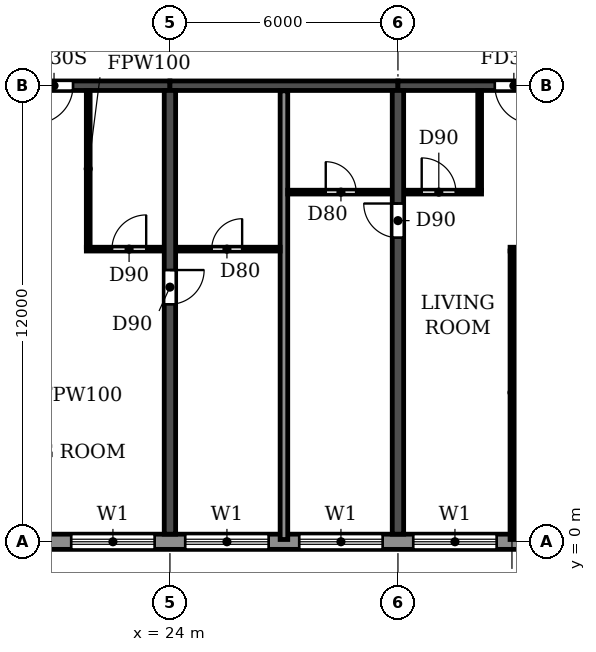
"""IFC4 building model, lengths in metres.
Left out: names, types, materials, properties, quantities, classifications, styles, units other than length and angle.
Written with IfcOpenShell. Run it as: python <this file> out.ifc"""

import sys

from ifc_helpers import new_model, si_unit, direction, frame, frame_2d, origin, place, context, subcontext, project, spatial, rectangle, extrude, element, fill, save


model = new_model("IFC4")
c1 = context("Model", 3, precision=1e-05, world=origin(), true_north=direction((0.0, 1.0)))
c2 = subcontext(c1, "Body", "Model", "MODEL_VIEW")
j1 = project(units=[si_unit("LENGTHUNIT", "METRE"), si_unit("PLANEANGLEUNIT", "RADIAN")], contexts=[c1])
p1 = place(None, origin())
s1 = spatial("IfcSite", under=j1, at=p1, CompositionType="ELEMENT")
p2 = place(p1, origin())
s2 = spatial("IfcBuilding", under=s1, at=p2, CompositionType="ELEMENT")
p3 = place(p2, frame((0.0, 0.0, 122.4)))
s3 = spatial("IfcBuildingStorey", under=s2, at=p3, CompositionType="ELEMENT", Elevation=122.4)
p4 = place(p3, frame((24.0, 0.2, 0.0), z_axis=(0.0, 0.0, 1.0), x_axis=(0.0, 1.0, 0.0)))
e1 = element("IfcWall", 1, at=p4, inside=s3, PredefinedType="SHEAR", context=c2, shape_type="SweptSolid", body=[
    extrude(rectangle(XDim=11.675, YDim=0.3, at=frame_2d((5.837, 0.0))), origin(), (0.0, 0.0, 1.0), 3.07),
])
p5 = place(p4, frame((6.05, 0.0, 0.0)))
e2 = element("IfcOpeningElement", 2, at=p5, cuts=e1, PredefinedType="OPENING", context=c2, shape_type="SweptSolid", body=[
    extrude(rectangle(XDim=0.9, YDim=2.1, at=frame_2d((0.45, 1.05))), frame((0.0, 0.16, 0.0), z_axis=(0.0, -1.0, 0.0), x_axis=(1.0, 0.0, 0.0)), (0.0, 0.0, 1.0), 0.32),
])
p6 = place(p3, frame((30.0, 0.2, 0.0), z_axis=(0.0, 0.0, 1.0), x_axis=(0.0, 1.0, 0.0)))
e3 = element("IfcWall", 3, at=p6, inside=s3, PredefinedType="SHEAR", context=c2, shape_type="SweptSolid", body=[
    extrude(rectangle(XDim=11.675, YDim=0.3, at=frame_2d((5.837, 0.0))), origin(), (0.0, 0.0, 1.0), 3.07),
])
p7 = place(p6, frame((7.8, 0.0, 0.0)))
e4 = element("IfcOpeningElement", 4, at=p7, cuts=e3, PredefinedType="OPENING", context=c2, shape_type="SweptSolid", body=[
    extrude(rectangle(XDim=0.9, YDim=2.1, at=frame_2d((0.45, 1.05))), frame((0.0, 0.16, 0.0), z_axis=(0.0, -1.0, 0.0), x_axis=(1.0, 0.0, 0.0)), (0.0, 0.0, 1.0), 0.32),
])
p8 = place(p3, frame((18.0, 12.0, 0.0), z_axis=(0.0, 0.0, 1.0), x_axis=(1.0, 0.0, 0.0)))
e5 = element("IfcWall", 5, at=p8, inside=s3, PredefinedType="SHEAR", context=c2, shape_type="SweptSolid", body=[
    extrude(rectangle(XDim=6.0, YDim=0.25, at=frame_2d((3.0, 0.0))), origin(), (0.0, 0.0, 1.0), 2.47),
])
p9 = place(p8, frame((2.45, 0.0, 0.0)))
e6 = element("IfcOpeningElement", 6, at=p9, cuts=e5, PredefinedType="OPENING", context=c2, shape_type="SweptSolid", body=[
    extrude(rectangle(XDim=1.0, YDim=2.1, at=frame_2d((0.5, 1.05))), frame((0.0, 0.135, 0.0), z_axis=(0.0, -1.0, 0.0), x_axis=(1.0, 0.0, 0.0)), (0.0, 0.0, 1.0), 0.27),
])
p10 = place(p3, frame((24.0, 12.0, 0.0), z_axis=(0.0, 0.0, 1.0), x_axis=(1.0, 0.0, 0.0)))
e7 = element("IfcWall", 7, at=p10, inside=s3, PredefinedType="SHEAR", context=c2, shape_type="SweptSolid", body=[
    extrude(rectangle(XDim=6.0, YDim=0.25, at=frame_2d((3.0, 0.0))), origin(), (0.0, 0.0, 1.0), 2.47),
])
p11 = place(p3, frame((30.0, 12.0, 0.0), z_axis=(0.0, 0.0, 1.0), x_axis=(1.0, 0.0, 0.0)))
e8 = element("IfcWall", 8, at=p11, inside=s3, PredefinedType="SHEAR", context=c2, shape_type="SweptSolid", body=[
    extrude(rectangle(XDim=6.0, YDim=0.25, at=frame_2d((3.0, 0.0))), origin(), (0.0, 0.0, 1.0), 2.47),
])
p12 = place(p11, frame((2.55, 0.0, 0.0)))
e9 = element("IfcOpeningElement", 9, at=p12, cuts=e8, PredefinedType="OPENING", context=c2, shape_type="SweptSolid", body=[
    extrude(rectangle(XDim=1.0, YDim=2.1, at=frame_2d((0.5, 1.05))), frame((0.0, 0.135, 0.0), z_axis=(0.0, -1.0, 0.0), x_axis=(1.0, 0.0, 0.0)), (0.0, 0.0, 1.0), 0.27),
])
p13 = place(p3, frame((16.683, 0.0, 0.0), z_axis=(0.0, 0.0, 1.0), x_axis=(1.0, 0.0, 0.0)))
e10 = element("IfcWall", 10, at=p13, inside=s3, PredefinedType="STANDARD", context=c2, shape_type="SweptSolid", body=[
    extrude(rectangle(XDim=68.634, YDim=0.4, at=frame_2d((34.317, 0.0))), origin(), (0.0, 0.0, 1.0), 3.07),
])
p14 = place(p13, frame((1.717, 0.0, 0.9)))
e11 = element("IfcOpeningElement", 11, at=p14, cuts=e10, PredefinedType="OPENING", context=c2, shape_type="SweptSolid", body=[
    extrude(rectangle(XDim=2.2, YDim=1.5, at=frame_2d((1.1, 0.75))), frame((0.0, 0.21, 0.0), z_axis=(0.0, -1.0, 0.0), x_axis=(1.0, 0.0, 0.0)), (0.0, 0.0, 1.0), 0.42),
])
p15 = place(p13, frame((4.717, 0.0, 0.9)))
e12 = element("IfcOpeningElement", 12, at=p15, cuts=e10, PredefinedType="OPENING", context=c2, shape_type="SweptSolid", body=[
    extrude(rectangle(XDim=2.2, YDim=1.5, at=frame_2d((1.1, 0.75))), frame((0.0, 0.21, 0.0), z_axis=(0.0, -1.0, 0.0), x_axis=(1.0, 0.0, 0.0)), (0.0, 0.0, 1.0), 0.42),
])
p16 = place(p13, frame((7.717, 0.0, 0.9)))
e13 = element("IfcOpeningElement", 13, at=p16, cuts=e10, PredefinedType="OPENING", context=c2, shape_type="SweptSolid", body=[
    extrude(rectangle(XDim=2.2, YDim=1.5, at=frame_2d((1.1, 0.75))), frame((0.0, 0.21, 0.0), z_axis=(0.0, -1.0, 0.0), x_axis=(1.0, 0.0, 0.0)), (0.0, 0.0, 1.0), 0.42),
])
p17 = place(p13, frame((10.717, 0.0, 0.9)))
e14 = element("IfcOpeningElement", 14, at=p17, cuts=e10, PredefinedType="OPENING", context=c2, shape_type="SweptSolid", body=[
    extrude(rectangle(XDim=2.2, YDim=1.5, at=frame_2d((1.1, 0.75))), frame((0.0, 0.21, 0.0), z_axis=(0.0, -1.0, 0.0), x_axis=(1.0, 0.0, 0.0)), (0.0, 0.0, 1.0), 0.42),
])
p18 = place(p13, frame((13.717, 0.0, 0.9)))
e15 = element("IfcOpeningElement", 15, at=p18, cuts=e10, PredefinedType="OPENING", context=c2, shape_type="SweptSolid", body=[
    extrude(rectangle(XDim=2.2, YDim=1.5, at=frame_2d((1.1, 0.75))), frame((0.0, 0.21, 0.0), z_axis=(0.0, -1.0, 0.0), x_axis=(1.0, 0.0, 0.0)), (0.0, 0.0, 1.0), 0.42),
])
p19 = place(p13, frame((16.717, 0.0, 0.9)))
e16 = element("IfcOpeningElement", 16, at=p19, cuts=e10, PredefinedType="OPENING", context=c2, shape_type="SweptSolid", body=[
    extrude(rectangle(XDim=2.2, YDim=1.5, at=frame_2d((1.1, 0.75))), frame((0.0, 0.21, 0.0), z_axis=(0.0, -1.0, 0.0), x_axis=(1.0, 0.0, 0.0)), (0.0, 0.0, 1.0), 0.42),
])
p20 = place(p13, frame((19.717, 0.0, 0.9)))
e17 = element("IfcOpeningElement", 17, at=p20, cuts=e10, PredefinedType="OPENING", context=c2, shape_type="SweptSolid", body=[
    extrude(rectangle(XDim=2.2, YDim=1.5, at=frame_2d((1.1, 0.75))), frame((0.0, 0.21, 0.0), z_axis=(0.0, -1.0, 0.0), x_axis=(1.0, 0.0, 0.0)), (0.0, 0.0, 1.0), 0.42),
])
p21 = place(p13, frame((22.917, 0.0, 0.0)))
e18 = element("IfcOpeningElement", 18, at=p21, cuts=e10, PredefinedType="OPENING", context=c2, shape_type="SweptSolid", body=[
    extrude(rectangle(XDim=1.8, YDim=2.4, at=frame_2d((0.9, 1.2))), frame((0.0, 0.21, 0.0), z_axis=(0.0, -1.0, 0.0), x_axis=(1.0, 0.0, 0.0)), (0.0, 0.0, 1.0), 0.42),
])
p22 = place(p13, frame((25.717, 0.0, 0.9)))
e19 = element("IfcOpeningElement", 19, at=p22, cuts=e10, PredefinedType="OPENING", context=c2, shape_type="SweptSolid", body=[
    extrude(rectangle(XDim=2.2, YDim=1.5, at=frame_2d((1.1, 0.75))), frame((0.0, 0.21, 0.0), z_axis=(0.0, -1.0, 0.0), x_axis=(1.0, 0.0, 0.0)), (0.0, 0.0, 1.0), 0.42),
])
p23 = place(p13, frame((28.717, 0.0, 0.9)))
e20 = element("IfcOpeningElement", 20, at=p23, cuts=e10, PredefinedType="OPENING", context=c2, shape_type="SweptSolid", body=[
    extrude(rectangle(XDim=2.2, YDim=1.5, at=frame_2d((1.1, 0.75))), frame((0.0, 0.21, 0.0), z_axis=(0.0, -1.0, 0.0), x_axis=(1.0, 0.0, 0.0)), (0.0, 0.0, 1.0), 0.42),
])
p24 = place(p13, frame((31.717, 0.0, 0.9)))
e21 = element("IfcOpeningElement", 21, at=p24, cuts=e10, PredefinedType="OPENING", context=c2, shape_type="SweptSolid", body=[
    extrude(rectangle(XDim=2.2, YDim=1.5, at=frame_2d((1.1, 0.75))), frame((0.0, 0.21, 0.0), z_axis=(0.0, -1.0, 0.0), x_axis=(1.0, 0.0, 0.0)), (0.0, 0.0, 1.0), 0.42),
])
p25 = place(p13, frame((34.917, 0.0, 0.0)))
e22 = element("IfcOpeningElement", 22, at=p25, cuts=e10, PredefinedType="OPENING", context=c2, shape_type="SweptSolid", body=[
    extrude(rectangle(XDim=1.8, YDim=2.4, at=frame_2d((0.9, 1.2))), frame((0.0, 0.21, 0.0), z_axis=(0.0, -1.0, 0.0), x_axis=(1.0, 0.0, 0.0)), (0.0, 0.0, 1.0), 0.42),
])
p26 = place(p13, frame((37.717, 0.0, 0.9)))
e23 = element("IfcOpeningElement", 23, at=p26, cuts=e10, PredefinedType="OPENING", context=c2, shape_type="SweptSolid", body=[
    extrude(rectangle(XDim=2.2, YDim=1.5, at=frame_2d((1.1, 0.75))), frame((0.0, 0.21, 0.0), z_axis=(0.0, -1.0, 0.0), x_axis=(1.0, 0.0, 0.0)), (0.0, 0.0, 1.0), 0.42),
])
p27 = place(p13, frame((40.717, 0.0, 0.9)))
e24 = element("IfcOpeningElement", 24, at=p27, cuts=e10, PredefinedType="OPENING", context=c2, shape_type="SweptSolid", body=[
    extrude(rectangle(XDim=2.2, YDim=1.5, at=frame_2d((1.1, 0.75))), frame((0.0, 0.21, 0.0), z_axis=(0.0, -1.0, 0.0), x_axis=(1.0, 0.0, 0.0)), (0.0, 0.0, 1.0), 0.42),
])
p28 = place(p13, frame((43.717, 0.0, 0.9)))
e25 = element("IfcOpeningElement", 25, at=p28, cuts=e10, PredefinedType="OPENING", context=c2, shape_type="SweptSolid", body=[
    extrude(rectangle(XDim=2.2, YDim=1.5, at=frame_2d((1.1, 0.75))), frame((0.0, 0.21, 0.0), z_axis=(0.0, -1.0, 0.0), x_axis=(1.0, 0.0, 0.0)), (0.0, 0.0, 1.0), 0.42),
])
p29 = place(p13, frame((46.917, 0.0, 0.0)))
e26 = element("IfcOpeningElement", 26, at=p29, cuts=e10, PredefinedType="OPENING", context=c2, shape_type="SweptSolid", body=[
    extrude(rectangle(XDim=1.8, YDim=2.4, at=frame_2d((0.9, 1.2))), frame((0.0, 0.21, 0.0), z_axis=(0.0, -1.0, 0.0), x_axis=(1.0, 0.0, 0.0)), (0.0, 0.0, 1.0), 0.42),
])
p30 = place(p13, frame((49.717, 0.0, 0.9)))
e27 = element("IfcOpeningElement", 27, at=p30, cuts=e10, PredefinedType="OPENING", context=c2, shape_type="SweptSolid", body=[
    extrude(rectangle(XDim=2.2, YDim=1.5, at=frame_2d((1.1, 0.75))), frame((0.0, 0.21, 0.0), z_axis=(0.0, -1.0, 0.0), x_axis=(1.0, 0.0, 0.0)), (0.0, 0.0, 1.0), 0.42),
])
p31 = place(p13, frame((52.717, 0.0, 0.9)))
e28 = element("IfcOpeningElement", 28, at=p31, cuts=e10, PredefinedType="OPENING", context=c2, shape_type="SweptSolid", body=[
    extrude(rectangle(XDim=2.2, YDim=1.5, at=frame_2d((1.1, 0.75))), frame((0.0, 0.21, 0.0), z_axis=(0.0, -1.0, 0.0), x_axis=(1.0, 0.0, 0.0)), (0.0, 0.0, 1.0), 0.42),
])
p32 = place(p13, frame((55.717, 0.0, 0.9)))
e29 = element("IfcOpeningElement", 29, at=p32, cuts=e10, PredefinedType="OPENING", context=c2, shape_type="SweptSolid", body=[
    extrude(rectangle(XDim=2.2, YDim=1.5, at=frame_2d((1.1, 0.75))), frame((0.0, 0.21, 0.0), z_axis=(0.0, -1.0, 0.0), x_axis=(1.0, 0.0, 0.0)), (0.0, 0.0, 1.0), 0.42),
])
p33 = place(p13, frame((58.917, 0.0, 0.0)))
e30 = element("IfcOpeningElement", 30, at=p33, cuts=e10, PredefinedType="OPENING", context=c2, shape_type="SweptSolid", body=[
    extrude(rectangle(XDim=1.8, YDim=2.4, at=frame_2d((0.9, 1.2))), frame((0.0, 0.21, 0.0), z_axis=(0.0, -1.0, 0.0), x_axis=(1.0, 0.0, 0.0)), (0.0, 0.0, 1.0), 0.42),
])
p34 = place(p13, frame((61.717, 0.0, 0.9)))
e31 = element("IfcOpeningElement", 31, at=p34, cuts=e10, PredefinedType="OPENING", context=c2, shape_type="SweptSolid", body=[
    extrude(rectangle(XDim=2.2, YDim=1.5, at=frame_2d((1.1, 0.75))), frame((0.0, 0.21, 0.0), z_axis=(0.0, -1.0, 0.0), x_axis=(1.0, 0.0, 0.0)), (0.0, 0.0, 1.0), 0.42),
])
p35 = place(p13, frame((64.717, 0.0, 0.9)))
e32 = element("IfcOpeningElement", 32, at=p35, cuts=e10, PredefinedType="OPENING", context=c2, shape_type="SweptSolid", body=[
    extrude(rectangle(XDim=2.2, YDim=1.5, at=frame_2d((1.1, 0.75))), frame((0.0, 0.21, 0.0), z_axis=(0.0, -1.0, 0.0), x_axis=(1.0, 0.0, 0.0)), (0.0, 0.0, 1.0), 0.42),
])
p36 = place(p3, frame((27.0, 0.06, 0.0), z_axis=(0.0, 0.0, 1.0), x_axis=(0.0, 1.0, 0.0)))
e33 = element("IfcWall", 33, at=p36, inside=s3, PredefinedType="PARTITIONING", context=c2, shape_type="SweptSolid", body=[
    extrude(rectangle(XDim=11.805, YDim=0.2, at=frame_2d((5.902, 0.0))), origin(), (0.0, 0.0, 1.0), 3.07),
])
p37 = place(p3, frame((21.8, 7.7, 0.0), z_axis=(0.0, 0.0, 1.0), x_axis=(1.0, 0.0, 0.0)))
e34 = element("IfcWall", 34, at=p37, inside=s3, PredefinedType="PARTITIONING", context=c2, shape_type="SweptSolid", body=[
    extrude(rectangle(XDim=2.04, YDim=0.1, at=frame_2d((1.02, 0.0))), origin(), (0.0, 0.0, 1.0), 3.07),
])
p38 = place(p37, frame((0.675, 0.0, 0.0)))
e35 = element("IfcOpeningElement", 35, at=p38, cuts=e34, PredefinedType="OPENING", context=c2, shape_type="SweptSolid", body=[
    extrude(rectangle(XDim=0.9, YDim=2.1, at=frame_2d((0.45, 1.05))), frame((0.0, 0.06, 0.0), z_axis=(0.0, -1.0, 0.0), x_axis=(1.0, 0.0, 0.0)), (0.0, 0.0, 1.0), 0.12),
])
p39 = place(p3, frame((24.16, 7.7, 0.0), z_axis=(0.0, 0.0, 1.0), x_axis=(1.0, 0.0, 0.0)))
e36 = element("IfcWall", 36, at=p39, inside=s3, PredefinedType="PARTITIONING", context=c2, shape_type="SweptSolid", body=[
    extrude(rectangle(XDim=2.74, YDim=0.1, at=frame_2d((1.37, 0.0))), origin(), (0.0, 0.0, 1.0), 3.07),
])
p40 = place(p39, frame((0.94, 0.0, 0.0)))
e37 = element("IfcOpeningElement", 37, at=p40, cuts=e36, PredefinedType="OPENING", context=c2, shape_type="SweptSolid", body=[
    extrude(rectangle(XDim=0.8, YDim=2.1, at=frame_2d((0.4, 1.05))), frame((0.0, 0.06, 0.0), z_axis=(0.0, -1.0, 0.0), x_axis=(1.0, 0.0, 0.0)), (0.0, 0.0, 1.0), 0.12),
])
p41 = place(p3, frame((32.95, 7.7, 0.0), z_axis=(0.0, 0.0, 1.0), x_axis=(1.0, 0.0, 0.0)))
e38 = element("IfcWall", 38, at=p41, inside=s3, PredefinedType="PARTITIONING", context=c2, shape_type="SweptSolid", body=[
    extrude(rectangle(XDim=2.89, YDim=0.1, at=frame_2d((1.445, 0.0))), origin(), (0.0, 0.0, 1.0), 3.07),
])
p42 = place(p41, frame((1.65, 0.0, 0.0)))
e39 = element("IfcOpeningElement", 39, at=p42, cuts=e38, PredefinedType="OPENING", context=c2, shape_type="SweptSolid", body=[
    extrude(rectangle(XDim=0.9, YDim=2.1, at=frame_2d((0.45, 1.05))), frame((0.0, 0.06, 0.0), z_axis=(0.0, -1.0, 0.0), x_axis=(1.0, 0.0, 0.0)), (0.0, 0.0, 1.0), 0.12),
])
p43 = place(p3, frame((27.1, 9.2, 0.0), z_axis=(0.0, 0.0, 1.0), x_axis=(1.0, 0.0, 0.0)))
e40 = element("IfcWall", 40, at=p43, inside=s3, PredefinedType="PARTITIONING", context=c2, shape_type="SweptSolid", body=[
    extrude(rectangle(XDim=2.74, YDim=0.1, at=frame_2d((1.37, 0.0))), origin(), (0.0, 0.0, 1.0), 3.07),
])
p44 = place(p43, frame((1.0, 0.0, 0.0)))
e41 = element("IfcOpeningElement", 41, at=p44, cuts=e40, PredefinedType="OPENING", context=c2, shape_type="SweptSolid", body=[
    extrude(rectangle(XDim=0.8, YDim=2.1, at=frame_2d((0.4, 1.05))), frame((0.0, 0.06, 0.0), z_axis=(0.0, -1.0, 0.0), x_axis=(1.0, 0.0, 0.0)), (0.0, 0.0, 1.0), 0.12),
])
p45 = place(p3, frame((30.16, 9.2, 0.0), z_axis=(0.0, 0.0, 1.0), x_axis=(1.0, 0.0, 0.0)))
e42 = element("IfcWall", 42, at=p45, inside=s3, PredefinedType="PARTITIONING", context=c2, shape_type="SweptSolid", body=[
    extrude(rectangle(XDim=2.04, YDim=0.1, at=frame_2d((1.02, 0.0))), origin(), (0.0, 0.0, 1.0), 3.07),
])
p46 = place(p45, frame((0.465, 0.0, 0.0)))
e43 = element("IfcOpeningElement", 43, at=p46, cuts=e42, PredefinedType="OPENING", context=c2, shape_type="SweptSolid", body=[
    extrude(rectangle(XDim=0.9, YDim=2.1, at=frame_2d((0.45, 1.05))), frame((0.0, 0.06, 0.0), z_axis=(0.0, -1.0, 0.0), x_axis=(1.0, 0.0, 0.0)), (0.0, 0.0, 1.0), 0.12),
])
p47 = place(p3, frame((21.85, 7.75, 0.0), z_axis=(0.0, 0.0, 1.0), x_axis=(0.0, 1.0, 0.0)))
e44 = element("IfcWall", 44, at=p47, inside=s3, PredefinedType="PARTITIONING", context=c2, shape_type="SweptSolid", body=[
    extrude(rectangle(XDim=4.115, YDim=0.1, at=frame_2d((2.058, 0.0))), origin(), (0.0, 0.0, 1.0), 3.07),
])
p48 = place(p3, frame((32.15, 9.25, 0.0), z_axis=(0.0, 0.0, 1.0), x_axis=(0.0, 1.0, 0.0)))
e45 = element("IfcWall", 45, at=p48, inside=s3, PredefinedType="PARTITIONING", context=c2, shape_type="SweptSolid", body=[
    extrude(rectangle(XDim=2.615, YDim=0.1, at=frame_2d((1.308, 0.0))), origin(), (0.0, 0.0, 1.0), 3.07),
])
p49 = place(p3, frame((33.0, 0.06, 0.0), z_axis=(0.0, 0.0, 1.0), x_axis=(0.0, 1.0, 0.0)))
e46 = element("IfcWall", 46, at=p49, inside=s3, PredefinedType="PARTITIONING", context=c2, shape_type="SweptSolid", body=[
    extrude(rectangle(XDim=7.59, YDim=0.1, at=frame_2d((3.795, 0.0))), origin(), (0.0, 0.0, 1.0), 3.07),
])
p50 = place(p15, origin())
e47 = element("IfcWindow", 47, at=p50, inside=s3, PartitioningType="DOUBLE_PANEL_HORIZONTAL", PredefinedType="WINDOW", context=c2, shape_type="SweptSolid", body=[
    extrude(rectangle(XDim=2.2, YDim=1.5, at=frame_2d((1.1, 0.75))), frame((0.0, 0.03, 0.0), z_axis=(0.0, -1.0, 0.0), x_axis=(1.0, 0.0, 0.0)), (0.0, 0.0, 1.0), 0.06),
])
fill(e12, e47)
p51 = place(p16, origin())
e48 = element("IfcWindow", 48, at=p51, inside=s3, PartitioningType="DOUBLE_PANEL_HORIZONTAL", PredefinedType="WINDOW", context=c2, shape_type="SweptSolid", body=[
    extrude(rectangle(XDim=2.2, YDim=1.5, at=frame_2d((1.1, 0.75))), frame((0.0, 0.03, 0.0), z_axis=(0.0, -1.0, 0.0), x_axis=(1.0, 0.0, 0.0)), (0.0, 0.0, 1.0), 0.06),
])
fill(e13, e48)
p52 = place(p17, origin())
e49 = element("IfcWindow", 49, at=p52, inside=s3, PartitioningType="DOUBLE_PANEL_HORIZONTAL", PredefinedType="WINDOW", context=c2, shape_type="SweptSolid", body=[
    extrude(rectangle(XDim=2.2, YDim=1.5, at=frame_2d((1.1, 0.75))), frame((0.0, 0.03, 0.0), z_axis=(0.0, -1.0, 0.0), x_axis=(1.0, 0.0, 0.0)), (0.0, 0.0, 1.0), 0.06),
])
fill(e14, e49)
p53 = place(p18, origin())
e50 = element("IfcWindow", 50, at=p53, inside=s3, PartitioningType="DOUBLE_PANEL_HORIZONTAL", PredefinedType="WINDOW", context=c2, shape_type="SweptSolid", body=[
    extrude(rectangle(XDim=2.2, YDim=1.5, at=frame_2d((1.1, 0.75))), frame((0.0, 0.03, 0.0), z_axis=(0.0, -1.0, 0.0), x_axis=(1.0, 0.0, 0.0)), (0.0, 0.0, 1.0), 0.06),
])
fill(e15, e50)
p54 = place(p40, origin())
e51 = element("IfcDoor", 51, at=p54, inside=s3, OperationType="SINGLE_SWING_RIGHT", PredefinedType="DOOR", context=c2, shape_type="SweptSolid", body=[
    extrude(rectangle(XDim=0.8, YDim=2.1, at=frame_2d((0.4, 1.05))), frame((0.0, 0.025, 0.0), z_axis=(0.0, -1.0, 0.0), x_axis=(1.0, 0.0, 0.0)), (0.0, 0.0, 1.0), 0.05),
])
fill(e37, e51)
p55 = place(p9, frame((1.0, 0.0, 0.0), z_axis=(0.0, 0.0, 1.0), x_axis=(-1.0, 0.0, 0.0)))
e52 = element("IfcDoor", 52, at=p55, inside=s3, OperationType="SINGLE_SWING_RIGHT", PredefinedType="DOOR", context=c2, shape_type="SweptSolid", body=[
    extrude(rectangle(XDim=1.0, YDim=2.1, at=frame_2d((0.5, 1.05))), frame((0.0, 0.025, 0.0), z_axis=(0.0, -1.0, 0.0), x_axis=(1.0, 0.0, 0.0)), (0.0, 0.0, 1.0), 0.05),
])
fill(e6, e52)
p56 = place(p38, origin())
e53 = element("IfcDoor", 53, at=p56, inside=s3, OperationType="SINGLE_SWING_RIGHT", PredefinedType="DOOR", context=c2, shape_type="SweptSolid", body=[
    extrude(rectangle(XDim=0.9, YDim=2.1, at=frame_2d((0.45, 1.05))), frame((0.0, 0.025, 0.0), z_axis=(0.0, -1.0, 0.0), x_axis=(1.0, 0.0, 0.0)), (0.0, 0.0, 1.0), 0.05),
])
fill(e35, e53)
p57 = place(p5, frame((0.9, 0.0, 0.0), z_axis=(0.0, 0.0, 1.0), x_axis=(-1.0, 0.0, 0.0)))
e54 = element("IfcDoor", 54, at=p57, inside=s3, OperationType="SINGLE_SWING_LEFT", PredefinedType="DOOR", context=c2, shape_type="SweptSolid", body=[
    extrude(rectangle(XDim=0.9, YDim=2.1, at=frame_2d((0.45, 1.05))), frame((0.0, 0.025, 0.0), z_axis=(0.0, -1.0, 0.0), x_axis=(1.0, 0.0, 0.0)), (0.0, 0.0, 1.0), 0.05),
])
fill(e2, e54)
p58 = place(p44, origin())
e55 = element("IfcDoor", 55, at=p58, inside=s3, OperationType="SINGLE_SWING_LEFT", PredefinedType="DOOR", context=c2, shape_type="SweptSolid", body=[
    extrude(rectangle(XDim=0.8, YDim=2.1, at=frame_2d((0.4, 1.05))), frame((0.0, 0.025, 0.0), z_axis=(0.0, -1.0, 0.0), x_axis=(1.0, 0.0, 0.0)), (0.0, 0.0, 1.0), 0.05),
])
fill(e41, e55)
p59 = place(p7, origin())
e56 = element("IfcDoor", 56, at=p59, inside=s3, OperationType="SINGLE_SWING_RIGHT", PredefinedType="DOOR", context=c2, shape_type="SweptSolid", body=[
    extrude(rectangle(XDim=0.9, YDim=2.1, at=frame_2d((0.45, 1.05))), frame((0.0, 0.025, 0.0), z_axis=(0.0, -1.0, 0.0), x_axis=(1.0, 0.0, 0.0)), (0.0, 0.0, 1.0), 0.05),
])
fill(e4, e56)
p60 = place(p46, origin())
e57 = element("IfcDoor", 57, at=p60, inside=s3, OperationType="SINGLE_SWING_LEFT", PredefinedType="DOOR", context=c2, shape_type="SweptSolid", body=[
    extrude(rectangle(XDim=0.9, YDim=2.1, at=frame_2d((0.45, 1.05))), frame((0.0, 0.025, 0.0), z_axis=(0.0, -1.0, 0.0), x_axis=(1.0, 0.0, 0.0)), (0.0, 0.0, 1.0), 0.05),
])
fill(e43, e57)
p61 = place(p12, frame((1.0, 0.0, 0.0), z_axis=(0.0, 0.0, 1.0), x_axis=(-1.0, 0.0, 0.0)))
e58 = element("IfcDoor", 58, at=p61, inside=s3, OperationType="SINGLE_SWING_LEFT", PredefinedType="DOOR", context=c2, shape_type="SweptSolid", body=[
    extrude(rectangle(XDim=1.0, YDim=2.1, at=frame_2d((0.5, 1.05))), frame((0.0, 0.025, 0.0), z_axis=(0.0, -1.0, 0.0), x_axis=(1.0, 0.0, 0.0)), (0.0, 0.0, 1.0), 0.05),
])
fill(e9, e58)
save(model, sys.argv[1])
